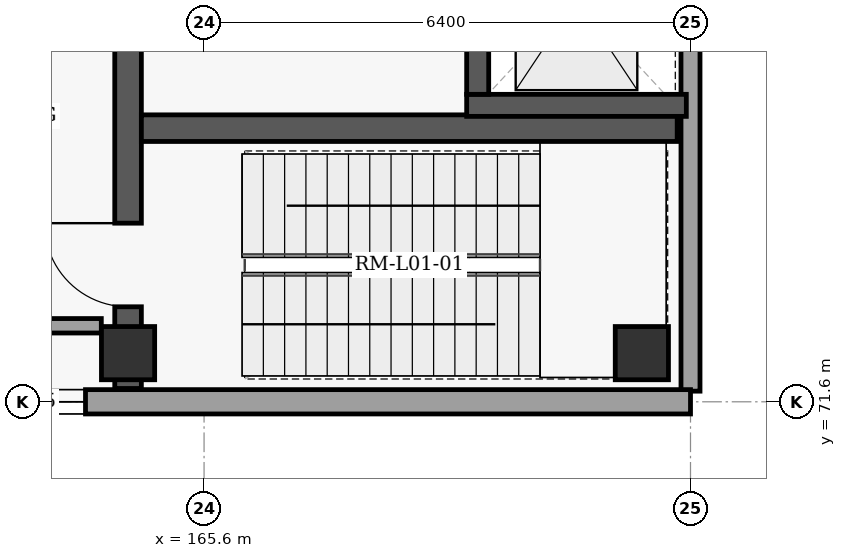
"""IFC4 building model, lengths in metres.
Left out: names, types, materials, properties, quantities, classifications, styles, units other than length and angle.
Written with IfcOpenShell. Run it as: python <this file> out.ifc"""

import sys

from ifc_helpers import new_model, si_unit, direction, frame, frame_2d, origin, origin_2d, place, context, subcontext, project, spatial, rectangle, extrude, element, fill, save


model = new_model("IFC4")
c1 = context("Model", 3, precision=1e-05, world=origin(), true_north=direction((0.0, 1.0)))
c2 = subcontext(c1, "Body", "Model", "MODEL_VIEW")
j1 = project(units=[si_unit("LENGTHUNIT", "METRE"), si_unit("PLANEANGLEUNIT", "RADIAN")], contexts=[c1])
p1 = place(None, origin())
s1 = spatial("IfcSite", under=j1, at=p1, CompositionType="ELEMENT")
p2 = place(p1, origin())
s2 = spatial("IfcBuilding", under=s1, at=p2, CompositionType="ELEMENT")
p3 = place(p2, frame((0.0, 0.0, 5.4)))
s3 = spatial("IfcBuildingStorey", under=s2, at=p3, CompositionType="ELEMENT", Elevation=5.4)
for number, where, z_axis, x_axis in (
    (1, (164.6, 72.24, 0.0), (0.0, 0.0, 1.0), (1.0, 0.0, 0.0)),
    (2, (171.36, 72.24, 0.0), (0.0, 0.0, 1.0), (1.0, 0.0, 0.0)),
):
    element("IfcColumn", number, at=place(p3, frame(where, z_axis=z_axis, x_axis=x_axis)), inside=s3, PredefinedType="COLUMN", context=c2, shape_type="SweptSolid", body=[
        extrude(rectangle(XDim=0.7, YDim=0.7, at=origin_2d()), origin(), (0.0, 0.0, 1.0), 4.8),
    ])
p4 = place(p3, frame((172.0, 117.86, 0.0), z_axis=(0.0, 0.0, 1.0), x_axis=(0.0, -1.0, 0.0)))
e3 = element("IfcWall", 3, at=p4, inside=s3, PredefinedType="SOLIDWALL", context=c2, shape_type="SweptSolid", body=[
    extrude(rectangle(XDim=46.12, YDim=0.25, at=frame_2d((23.06, 0.0))), origin(), (0.0, 0.0, 1.0), 4.55),
])
p5 = place(p3, frame((172.0, 71.6, 0.0), z_axis=(0.0, 0.0, 1.0), x_axis=(-1.0, 0.0, 0.0)))
e4 = element("IfcWall", 4, at=p5, inside=s3, PredefinedType="SOLIDWALL", context=c2, shape_type="SweptSolid", body=[
    extrude(rectangle(XDim=32.4, YDim=0.32, at=frame_2d((16.2, 0.0))), origin(), (0.0, 0.0, 1.0), 3.85),
])
p6 = place(p5, frame((7.96, 0.0, 0.8)))
e5 = element("IfcOpeningElement", 5, at=p6, cuts=e4, PredefinedType="OPENING", context=c2, shape_type="SweptSolid", body=[
    extrude(rectangle(XDim=1.6, YDim=1.65, at=frame_2d((0.8, 0.825))), frame((0.0, 0.17, 0.0), z_axis=(0.0, -1.0, 0.0), x_axis=(1.0, 0.0, 0.0)), (0.0, 0.0, 1.0), 0.34),
])
p7 = place(p5, frame((19.48, 0.0, 0.8)))
e6 = element("IfcOpeningElement", 6, at=p7, cuts=e4, PredefinedType="OPENING", context=c2, shape_type="SweptSolid", body=[
    extrude(rectangle(XDim=1.6, YDim=1.65, at=frame_2d((0.8, 0.825))), frame((0.0, 0.17, 0.0), z_axis=(0.0, -1.0, 0.0), x_axis=(1.0, 0.0, 0.0)), (0.0, 0.0, 1.0), 0.34),
])
p8 = place(p5, frame((25.24, 0.0, 0.8)))
e7 = element("IfcOpeningElement", 7, at=p8, cuts=e4, PredefinedType="OPENING", context=c2, shape_type="SweptSolid", body=[
    extrude(rectangle(XDim=1.6, YDim=1.65, at=frame_2d((0.8, 0.825))), frame((0.0, 0.17, 0.0), z_axis=(0.0, -1.0, 0.0), x_axis=(1.0, 0.0, 0.0)), (0.0, 0.0, 1.0), 0.34),
])
p9 = place(p5, frame((13.8, 0.0, 0.0)))
e8 = element("IfcOpeningElement", 8, at=p9, cuts=e4, PredefinedType="OPENING", context=c2, shape_type="SweptSolid", body=[
    extrude(rectangle(XDim=1.4, YDim=2.25, at=frame_2d((0.7, 1.125))), frame((0.0, 0.17, 0.0), z_axis=(0.0, -1.0, 0.0), x_axis=(1.0, 0.0, 0.0)), (0.0, 0.0, 1.0), 0.34),
])
p10 = place(p3, frame((164.6, 71.775, 0.0), z_axis=(0.0, 0.0, 1.0), x_axis=(0.0, 1.0, 0.0)))
e9 = element("IfcWall", 9, at=p10, inside=s3, PredefinedType="SHEAR", context=c2, shape_type="SweptSolid", body=[
    extrude(rectangle(XDim=7.473, YDim=0.35, at=frame_2d((3.737, 0.0))), origin(), (0.0, 0.0, 1.0), 4.55),
])
p11 = place(p10, frame((1.075, 0.0, 0.0)))
e10 = element("IfcOpeningElement", 10, at=p11, cuts=e9, PredefinedType="OPENING", context=c2, shape_type="SweptSolid", body=[
    extrude(rectangle(XDim=1.1, YDim=2.15, at=frame_2d((0.55, 1.075))), frame((0.0, 0.185, 0.0), z_axis=(0.0, -1.0, 0.0), x_axis=(1.0, 0.0, 0.0)), (0.0, 0.0, 1.0), 0.37),
])
p12 = place(p10, frame((5.05, 0.0, 0.0)))
e11 = element("IfcOpeningElement", 11, at=p12, cuts=e9, PredefinedType="OPENING", context=c2, shape_type="SweptSolid", body=[
    extrude(rectangle(XDim=1.15, YDim=2.2, at=frame_2d((0.575, 1.1))), frame((0.0, 0.185, 0.0), z_axis=(0.0, -1.0, 0.0), x_axis=(1.0, 0.0, 0.0)), (0.0, 0.0, 1.0), 0.37),
])
p13 = place(p3, frame((164.775, 75.2, 0.0), z_axis=(0.0, 0.0, 1.0), x_axis=(1.0, 0.0, 0.0)))
e12 = element("IfcWall", 12, at=p13, inside=s3, PredefinedType="SHEAR", context=c2, shape_type="SweptSolid", body=[
    extrude(rectangle(XDim=7.05, YDim=0.35, at=frame_2d((3.525, 0.0))), origin(), (0.0, 0.0, 1.0), 4.55),
])
p14 = place(p3, frame((169.055, 75.5, 0.0), z_axis=(0.0, 0.0, 1.0), x_axis=(1.0, 0.0, 0.0)))
e13 = element("IfcWall", 13, at=p14, inside=s3, PredefinedType="SHEAR", context=c2, shape_type="SweptSolid", body=[
    extrude(rectangle(XDim=2.89, YDim=0.29, at=frame_2d((1.445, 0.0))), origin(), (0.0, 0.0, 1.0), 4.55),
])
p15 = place(p3, frame((169.2, 75.645, 0.0), z_axis=(0.0, 0.0, 1.0), x_axis=(0.0, 1.0, 0.0)))
e14 = element("IfcWall", 14, at=p15, inside=s3, PredefinedType="SHEAR", context=c2, shape_type="SweptSolid", body=[
    extrude(rectangle(XDim=2.51, YDim=0.29, at=frame_2d((1.255, 0.0))), origin(), (0.0, 0.0, 1.0), 4.55),
])
p16 = place(p15, frame((0.705, 0.0, 0.0)))
e15 = element("IfcOpeningElement", 15, at=p16, cuts=e14, PredefinedType="OPENING", context=c2, shape_type="SweptSolid", body=[
    extrude(rectangle(XDim=1.1, YDim=2.15, at=frame_2d((0.55, 1.075))), frame((0.0, 0.155, 0.0), z_axis=(0.0, -1.0, 0.0), x_axis=(1.0, 0.0, 0.0)), (0.0, 0.0, 1.0), 0.31),
])
p17 = place(p3, frame((160.105, 72.6, 0.0), z_axis=(0.0, 0.0, 1.0), x_axis=(1.0, 0.0, 0.0)))
e16 = element("IfcWall", 16, at=p17, inside=s3, PredefinedType="PARTITIONING", context=c2, shape_type="SweptSolid", body=[
    extrude(rectangle(XDim=4.143, YDim=0.19, at=frame_2d((2.072, 0.0))), origin(), (0.0, 0.0, 1.0), 3.9),
])
p18 = place(p6, origin())
e17 = element("IfcWindow", 17, at=p18, inside=s3, PartitioningType="SINGLE_PANEL", PredefinedType="WINDOW", context=c2, shape_type="SweptSolid", body=[
    extrude(rectangle(XDim=1.6, YDim=1.65, at=frame_2d((0.8, 0.825))), frame((0.0, 0.03, 0.0), z_axis=(0.0, -1.0, 0.0), x_axis=(1.0, 0.0, 0.0)), (0.0, 0.0, 1.0), 0.06),
])
fill(e5, e17)
p19 = place(p11, origin())
e18 = element("IfcDoor", 18, at=p19, inside=s3, OperationType="SINGLE_SWING_RIGHT", PredefinedType="DOOR", context=c2, shape_type="SweptSolid", body=[
    extrude(rectangle(XDim=1.1, YDim=2.15, at=frame_2d((0.55, 1.075))), frame((0.0, 0.025, 0.0), z_axis=(0.0, -1.0, 0.0), x_axis=(1.0, 0.0, 0.0)), (0.0, 0.0, 1.0), 0.05),
])
fill(e10, e18)
save(model, sys.argv[1])
